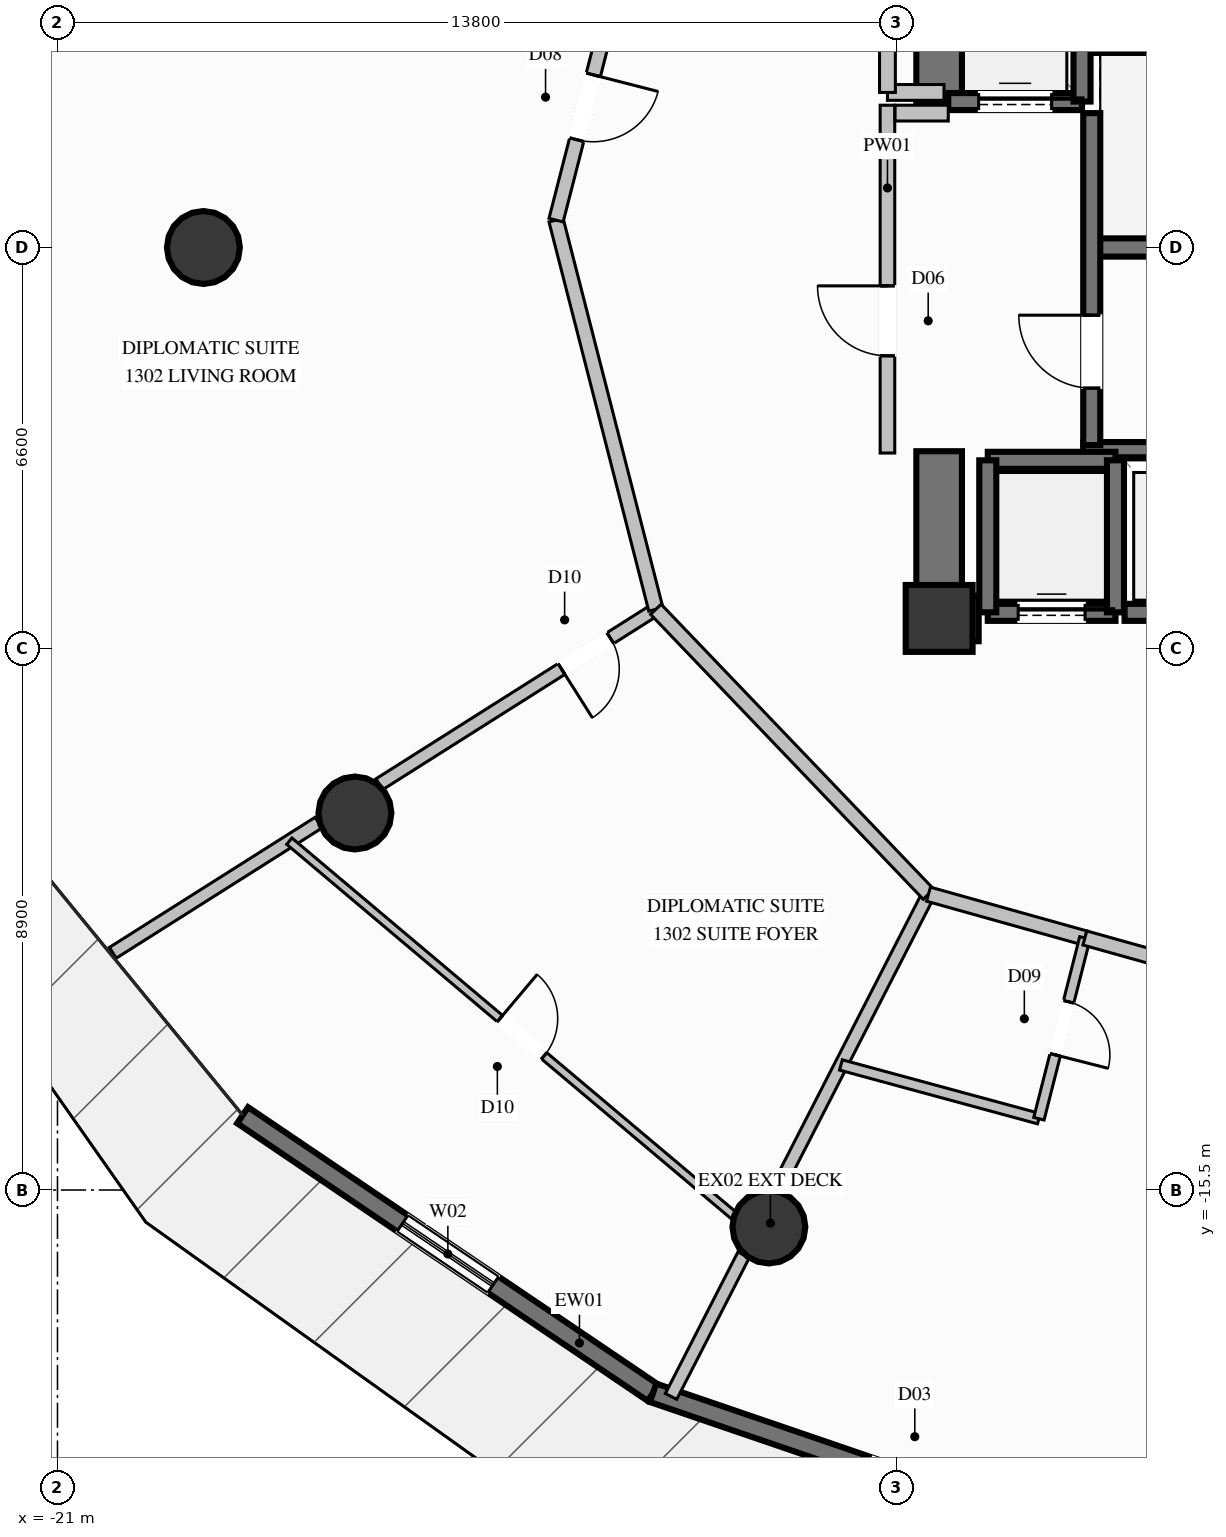
"""IFC4 building model, lengths in metres.
Left out: names, types, materials, properties, quantities, classifications, styles, units other than length and angle.
Written with IfcOpenShell. Run it as: python <this file> out.ifc"""

import sys

from ifc_helpers import new_model, si_unit, direction, frame, frame_2d, origin, origin_2d, place, context, subcontext, project, spatial, rectangle, circle, extrude, element, fill, save


model = new_model("IFC4")
c1 = context("Model", 3, precision=1e-05, world=origin(), true_north=direction((0.0, 1.0)))
c2 = subcontext(c1, "Body", "Model", "MODEL_VIEW")
j1 = project(units=[si_unit("LENGTHUNIT", "METRE"), si_unit("PLANEANGLEUNIT", "RADIAN")], contexts=[c1])
p1 = place(None, origin())
s1 = spatial("IfcSite", under=j1, at=p1, CompositionType="ELEMENT")
p2 = place(p1, origin())
s2 = spatial("IfcBuilding", under=s1, at=p2, CompositionType="ELEMENT")
p3 = place(p2, frame((0.0, 0.0, 50.0)))
s3 = spatial("IfcBuildingStorey", under=s2, at=p3, CompositionType="ELEMENT", Elevation=50.0)
p4 = place(p3, frame((-6.5, -6.1, 0.0), z_axis=(0.0, 0.0, 1.0), x_axis=(1.0, 0.0, 0.0)))
e1 = element("IfcColumn", 1, at=p4, inside=s3, PredefinedType="COLUMN", context=c2, shape_type="SweptSolid", body=[
    extrude(rectangle(XDim=1.1, YDim=1.1, at=origin_2d()), origin(), (0.0, 0.0, 1.0), 3.6),
])
p5 = place(p3, frame((-3.99, 0.0, 0.0), z_axis=(0.0, 0.0, 1.0), x_axis=(1.0, 0.0, 0.0)))
e2 = element("IfcWall", 2, at=p5, inside=s3, PredefinedType="SHEAR", context=c2, shape_type="SweptSolid", body=[
    extrude(rectangle(XDim=7.98, YDim=0.3, at=frame_2d((3.99, 0.0))), origin(), (0.0, 0.0, 1.0), 3.6),
])
for number, where, z_axis, x_axis in (
    (3, (-4.13, -3.325, 0.0), (0.0, 0.0, 1.0), (1.0, 0.0, 0.0)),
    (4, (-4.13, 3.325, 0.0), (0.0, 0.0, 1.0), (1.0, 0.0, 0.0)),
):
    element("IfcWall", number, at=place(p3, frame(where, z_axis=z_axis, x_axis=x_axis)), inside=s3, PredefinedType="SOLIDWALL", context=c2, shape_type="SweptSolid", body=[
        extrude(rectangle(XDim=8.26, YDim=0.25, at=frame_2d((4.13, 0.0))), origin(), (0.0, 0.0, 1.0), 3.6),
    ])
p6 = place(p3, frame((-6.125, -6.1, 0.0), z_axis=(0.0, 0.0, 1.0), x_axis=(1.0, 0.0, 0.0)))
e5 = element("IfcWall", 5, at=p6, inside=s3, PredefinedType="SHEAR", context=c2, shape_type="SweptSolid", body=[
    extrude(rectangle(XDim=0.275, YDim=0.75, at=frame_2d((0.137, 0.0))), origin(), (0.0, 0.0, 1.0), 3.6),
])
p7 = place(p3, frame((-6.5, 2.35, 0.0), z_axis=(0.0, 0.0, 1.0), x_axis=(0.0, 1.0, 0.0)))
e6 = element("IfcWall", 6, at=p7, inside=s3, PredefinedType="SHEAR", context=c2, shape_type="SweptSolid", body=[
    extrude(rectangle(XDim=4.125, YDim=0.75, at=frame_2d((2.062, 0.0))), origin(), (0.0, 0.0, 1.0), 3.6),
])
p8 = place(p3, frame((-6.5, -6.475, 0.0), z_axis=(0.0, 0.0, 1.0), x_axis=(0.0, 1.0, 0.0)))
e7 = element("IfcWall", 7, at=p8, inside=s3, PredefinedType="SHEAR", context=c2, shape_type="SweptSolid", body=[
    extrude(rectangle(XDim=3.125, YDim=0.75, at=frame_2d((1.562, 0.0))), origin(), (0.0, 0.0, 1.0), 3.6),
])
for number, where, z_axis, x_axis in (
    (8, (-18.6, 0.0, 0.0), (0.0, 0.0, 1.0), (1.0, 0.0, 0.0)),
    (9, (-16.108, -9.3, 0.0), (0.0, 0.0, 1.0), (1.0, 0.0, 0.0)),
    (10, (-9.3, -16.108, 0.0), (0.0, 0.0, 1.0), (1.0, 0.0, 0.0)),
):
    element("IfcColumn", number, at=place(p3, frame(where, z_axis=z_axis, x_axis=x_axis)), inside=s3, PredefinedType="COLUMN", context=c2, shape_type="SweptSolid", body=[
        extrude(circle(Radius=0.6, at=origin_2d()), origin(), (0.0, 0.0, 1.0), 3.6),
    ])
p9 = place(p3, frame((-11.204, -18.835, 0.0), z_axis=(0.0, 0.0, 1.0), x_axis=(-0.828391352283, 0.560149772349, 0.0)))
e11 = element("IfcWall", 11, at=p9, inside=s3, PredefinedType="SOLIDWALL", context=c2, shape_type="SweptSolid", body=[
    extrude(rectangle(XDim=8.149, YDim=0.32, at=frame_2d((4.075, 0.0))), origin(), (0.0, 0.0, 1.0), 3.34),
])
p10 = place(p9, frame((3.175, 0.0, 0.35)))
e12 = element("IfcOpeningElement", 12, at=p10, cuts=e11, PredefinedType="OPENING", context=c2, shape_type="SweptSolid", body=[
    extrude(rectangle(XDim=1.8, YDim=2.6, at=frame_2d((0.9, 1.3))), frame((0.0, 0.17, 0.0), z_axis=(0.0, -1.0, 0.0), x_axis=(1.0, 0.0, 0.0)), (0.0, 0.0, 1.0), 0.34),
])
p11 = place(p3, frame((-3.244, -21.557, 0.0), z_axis=(0.0, 0.0, 1.0), x_axis=(-0.94621145459, 0.323548888429, 0.0)))
e13 = element("IfcWall", 13, at=p11, inside=s3, PredefinedType="SOLIDWALL", context=c2, shape_type="SweptSolid", body=[
    extrude(rectangle(XDim=8.413, YDim=0.32, at=frame_2d((4.206, 0.0))), origin(), (0.0, 0.0, 1.0), 3.34),
])
p12 = place(p11, frame((3.557, 0.0, 0.0)))
e14 = element("IfcOpeningElement", 14, at=p12, cuts=e13, PredefinedType="OPENING", context=c2, shape_type="SweptSolid", body=[
    extrude(rectangle(XDim=1.1, YDim=2.2, at=frame_2d((0.55, 1.1))), frame((0.0, 0.17, 0.0), z_axis=(0.0, -1.0, 0.0), x_axis=(1.0, 0.0, 0.0)), (0.0, 0.0, 1.0), 0.34),
])
p13 = place(p3, frame((-5.7, -6.0, 0.0), z_axis=(0.0, 0.0, 1.0), x_axis=(1.0, 0.0, 0.0)))
e15 = element("IfcWall", 15, at=p13, inside=s3, PredefinedType="SOLIDWALL", context=c2, shape_type="SweptSolid", body=[
    extrude(rectangle(XDim=2.1, YDim=0.28, at=frame_2d((1.05, 0.0))), origin(), (0.0, 0.0, 1.0), 3.34),
])
p14 = place(p13, frame((0.5, 0.0, 0.0)))
e16 = element("IfcOpeningElement", 16, at=p14, cuts=e15, PredefinedType="OPENING", context=c2, shape_type="SweptSolid", body=[
    extrude(rectangle(XDim=1.1, YDim=2.2, at=frame_2d((0.55, 1.1))), frame((0.0, 0.15, 0.0), z_axis=(0.0, -1.0, 0.0), x_axis=(1.0, 0.0, 0.0)), (0.0, 0.0, 1.0), 0.3),
])
p15 = place(p3, frame((-3.6, -3.5, 0.0), z_axis=(0.0, 0.0, 1.0), x_axis=(-1.0, 0.0, 0.0)))
e17 = element("IfcWall", 17, at=p15, inside=s3, PredefinedType="SOLIDWALL", context=c2, shape_type="SweptSolid", body=[
    extrude(rectangle(XDim=2.1, YDim=0.28, at=frame_2d((1.05, 0.0))), origin(), (0.0, 0.0, 1.0), 3.34),
])
for number, where, z_axis, x_axis in (
    (18, (-5.7, -3.5, 0.0), (0.0, 0.0, 1.0), (0.0, -1.0, 0.0)),
    (19, (-3.6, -6.0, 0.0), (0.0, 0.0, 1.0), (0.0, 1.0, 0.0)),
):
    element("IfcWall", number, at=place(p3, frame(where, z_axis=z_axis, x_axis=x_axis)), inside=s3, PredefinedType="SOLIDWALL", context=c2, shape_type="SweptSolid", body=[
        extrude(rectangle(XDim=2.5, YDim=0.28, at=frame_2d((1.25, 0.0))), origin(), (0.0, 0.0, 1.0), 3.34),
    ])
p16 = place(p3, frame((-3.45, -6.0, 0.0), z_axis=(0.0, 0.0, 1.0), x_axis=(1.0, 0.0, 0.0)))
e20 = element("IfcWall", 20, at=p16, inside=s3, PredefinedType="SOLIDWALL", context=c2, shape_type="SweptSolid", body=[
    extrude(rectangle(XDim=2.1, YDim=0.28, at=frame_2d((1.05, 0.0))), origin(), (0.0, 0.0, 1.0), 3.34),
])
p17 = place(p16, frame((0.5, 0.0, 0.0)))
e21 = element("IfcOpeningElement", 21, at=p17, cuts=e20, PredefinedType="OPENING", context=c2, shape_type="SweptSolid", body=[
    extrude(rectangle(XDim=1.1, YDim=2.2, at=frame_2d((0.55, 1.1))), frame((0.0, 0.15, 0.0), z_axis=(0.0, -1.0, 0.0), x_axis=(1.0, 0.0, 0.0)), (0.0, 0.0, 1.0), 0.3),
])
p18 = place(p3, frame((-6.35, 2.4, 0.0), z_axis=(0.0, 0.0, 1.0), x_axis=(1.0, 0.0, 0.0)))
e22 = element("IfcWall", 22, at=p18, inside=s3, PredefinedType="SOLIDWALL", context=c2, shape_type="SweptSolid", body=[
    extrude(rectangle(XDim=2.2, YDim=0.28, at=frame_2d((1.1, 0.0))), origin(), (0.0, 0.0, 1.0), 3.34),
])
p19 = place(p18, frame((0.5, 0.0, 0.0)))
e23 = element("IfcOpeningElement", 23, at=p19, cuts=e22, PredefinedType="OPENING", context=c2, shape_type="SweptSolid", body=[
    extrude(rectangle(XDim=1.2, YDim=2.2, at=frame_2d((0.6, 1.1))), frame((0.0, 0.15, 0.0), z_axis=(0.0, -1.0, 0.0), x_axis=(1.0, 0.0, 0.0)), (0.0, 0.0, 1.0), 0.3),
])
p20 = place(p3, frame((-4.15, 2.4, 0.0), z_axis=(0.0, 0.0, 1.0), x_axis=(0.0, 1.0, 0.0)))
e24 = element("IfcWall", 24, at=p20, inside=s3, PredefinedType="SOLIDWALL", context=c2, shape_type="SweptSolid", body=[
    extrude(rectangle(XDim=2.7, YDim=0.28, at=frame_2d((1.35, 0.0))), origin(), (0.0, 0.0, 1.0), 3.34),
])
p21 = place(p3, frame((-3.99, -3.25, 0.0), z_axis=(0.0, 0.0, 1.0), x_axis=(0.0, 1.0, 0.0)))
e25 = element("IfcWall", 25, at=p21, inside=s3, PredefinedType="SOLIDWALL", context=c2, shape_type="SweptSolid", body=[
    extrude(rectangle(XDim=5.46, YDim=0.28, at=frame_2d((2.73, 0.0))), origin(), (0.0, 0.0, 1.0), 3.34),
])
p22 = place(p21, frame((0.937, 0.0, 0.0)))
e26 = element("IfcOpeningElement", 26, at=p22, cuts=e25, PredefinedType="OPENING", context=c2, shape_type="SweptSolid", body=[
    extrude(rectangle(XDim=1.2, YDim=2.2, at=frame_2d((0.6, 1.1))), frame((0.0, 0.15, 0.0), z_axis=(0.0, -1.0, 0.0), x_axis=(1.0, 0.0, 0.0)), (0.0, 0.0, 1.0), 0.3),
])
p23 = place(p3, frame((-7.35, -3.38, 0.0), z_axis=(0.0, 0.0, 1.0), x_axis=(0.0, 1.0, 0.0)))
e27 = element("IfcWall", 27, at=p23, inside=s3, PredefinedType="PARTITIONING", context=c2, shape_type="SweptSolid", body=[
    extrude(rectangle(XDim=5.72, YDim=0.24, at=frame_2d((2.86, 0.0))), origin(), (0.0, 0.0, 1.0), 2.425),
])
p24 = place(p23, frame((1.599, 0.0, 0.0)))
e28 = element("IfcOpeningElement", 28, at=p24, cuts=e27, PredefinedType="OPENING", context=c2, shape_type="SweptSolid", body=[
    extrude(rectangle(XDim=1.15, YDim=2.2, at=frame_2d((0.575, 1.1))), frame((0.0, 0.13, 0.0), z_axis=(0.0, -1.0, 0.0), x_axis=(1.0, 0.0, 0.0)), (0.0, 0.0, 1.0), 0.26),
])
p25 = place(p3, frame((-7.225, 2.21, 0.0), z_axis=(0.0, 0.0, 1.0), x_axis=(1.0, 0.0, 0.0)))
e29 = element("IfcWall", 29, at=p25, inside=s3, PredefinedType="PARTITIONING", context=c2, shape_type="SweptSolid", body=[
    extrude(rectangle(XDim=0.875, YDim=0.26, at=frame_2d((0.438, 0.0))), origin(), (0.0, 0.0, 1.0), 3.34),
])
p26 = place(p3, frame((-7.35, 2.55, 0.0), z_axis=(0.0, 0.0, 1.0), x_axis=(1.0, 0.0, 0.0)))
e30 = element("IfcWall", 30, at=p26, inside=s3, PredefinedType="PARTITIONING", context=c2, shape_type="SweptSolid", body=[
    extrude(rectangle(XDim=0.93, YDim=0.26, at=frame_2d((0.465, 0.0))), origin(), (0.0, 0.0, 1.0), 3.34),
])
p27 = place(p3, frame((-7.35, 2.55, 0.0), z_axis=(0.0, 0.0, 1.0), x_axis=(0.0, 1.0, 0.0)))
e31 = element("IfcWall", 31, at=p27, inside=s3, PredefinedType="PARTITIONING", context=c2, shape_type="SweptSolid", body=[
    extrude(rectangle(XDim=2.4, YDim=0.26, at=frame_2d((1.2, 0.0))), origin(), (0.0, 0.0, 1.0), 2.425),
])
p28 = place(p27, frame((0.775, 0.0, 0.0)))
e32 = element("IfcOpeningElement", 32, at=p28, cuts=e31, PredefinedType="OPENING", context=c2, shape_type="SweptSolid", body=[
    extrude(rectangle(XDim=0.85, YDim=2.05, at=frame_2d((0.425, 1.025))), frame((0.0, 0.14, 0.0), z_axis=(0.0, -1.0, 0.0), x_axis=(1.0, 0.0, 0.0)), (0.0, 0.0, 1.0), 0.28),
])
p29 = place(p3, frame((-11.159, -5.95, 0.0), z_axis=(0.0, 0.0, 1.0), x_axis=(-0.845113553302, -0.534586833008, 0.0)))
e33 = element("IfcWall", 33, at=p29, inside=s3, PredefinedType="PARTITIONING", context=c2, shape_type="SweptSolid", body=[
    extrude(rectangle(XDim=5.382, YDim=0.21, at=frame_2d((2.691, 0.0))), origin(), (0.0, 0.0, 1.0), 2.708),
])
p30 = place(p29, frame((0.886, 0.0, 0.0)))
e34 = element("IfcOpeningElement", 34, at=p30, cuts=e33, PredefinedType="OPENING", context=c2, shape_type="SweptSolid", body=[
    extrude(rectangle(XDim=0.95, YDim=2.1, at=frame_2d((0.475, 1.05))), frame((0.0, 0.115, 0.0), z_axis=(0.0, -1.0, 0.0), x_axis=(1.0, 0.0, 0.0)), (0.0, 0.0, 1.0), 0.23),
])
p31 = place(p3, frame((-16.707, -9.459, 0.0), z_axis=(0.0, 0.0, 1.0), x_axis=(-0.845097392872, -0.53461237973, 0.0)))
e35 = element("IfcWall", 35, at=p31, inside=s3, PredefinedType="PARTITIONING", context=c2, shape_type="SweptSolid", body=[
    extrude(rectangle(XDim=4.003, YDim=0.21, at=frame_2d((2.001, 0.0))), origin(), (0.0, 0.0, 1.0), 3.34),
])
p32 = place(p3, frame((-6.675, -10.635, 0.0), z_axis=(0.0, 0.0, 1.0), x_axis=(-0.456172544556, -0.889891347072, 0.0)))
e36 = element("IfcWall", 36, at=p32, inside=s3, PredefinedType="PARTITIONING", context=c2, shape_type="SweptSolid", body=[
    extrude(rectangle(XDim=5.469, YDim=0.21, at=frame_2d((2.735, 0.0))), origin(), (0.0, 0.0, 1.0), 2.708),
])
p33 = place(p3, frame((-9.716, -16.567, 0.0), z_axis=(0.0, 0.0, 1.0), x_axis=(-0.456153637775, -0.889901038737, 0.0)))
e37 = element("IfcWall", 37, at=p33, inside=s3, PredefinedType="PARTITIONING", context=c2, shape_type="SweptSolid", body=[
    extrude(rectangle(XDim=2.615, YDim=0.21, at=frame_2d((1.308, 0.0))), origin(), (0.0, 0.0, 1.0), 3.34),
])
p34 = place(p3, frame((-12.8, 0.45, 0.0), z_axis=(0.0, 0.0, 1.0), x_axis=(0.24839135289, -0.968659762667, 0.0)))
e38 = element("IfcWall", 38, at=p34, inside=s3, PredefinedType="PARTITIONING", context=c2, shape_type="SweptSolid", body=[
    extrude(rectangle(XDim=6.607, YDim=0.24, at=frame_2d((3.303, 0.0))), origin(), (0.0, 0.0, 1.0), 2.919),
])
p35 = place(p3, frame((-11.848, 4.162, 0.0), z_axis=(0.0, 0.0, 1.0), x_axis=(-0.248451984896, -0.968644212909, 0.0)))
e39 = element("IfcWall", 39, at=p35, inside=s3, PredefinedType="PARTITIONING", context=c2, shape_type="SweptSolid", body=[
    extrude(rectangle(XDim=3.832, YDim=0.24, at=frame_2d((1.916, 0.0))), origin(), (0.0, 0.0, 1.0), 3.34),
])
p36 = place(p35, frame((1.366, 0.0, 0.0)))
e40 = element("IfcOpeningElement", 40, at=p36, cuts=e39, PredefinedType="OPENING", context=c2, shape_type="SweptSolid", body=[
    extrude(rectangle(XDim=1.1, YDim=2.3, at=frame_2d((0.55, 1.15))), frame((0.0, 0.13, 0.0), z_axis=(0.0, -1.0, 0.0), x_axis=(1.0, 0.0, 0.0)), (0.0, 0.0, 1.0), 0.26),
])
p37 = place(p3, frame((-11.159, -5.95, 0.0), z_axis=(0.0, 0.0, 1.0), x_axis=(0.691426053968, -0.722447238138, 0.0)))
e41 = element("IfcWall", 41, at=p37, inside=s3, PredefinedType="PARTITIONING", context=c2, shape_type="SweptSolid", body=[
    extrude(rectangle(XDim=6.485, YDim=0.24, at=frame_2d((3.242, 0.0))), origin(), (0.0, 0.0, 1.0), 3.34),
])
p38 = place(p3, frame((-17.187, -9.763, 0.0), z_axis=(0.0, 0.0, 1.0), x_axis=(0.764837174909, -0.644223638092, 0.0)))
e42 = element("IfcWall", 42, at=p38, inside=s3, PredefinedType="PARTITIONING", context=c2, shape_type="SweptSolid", body=[
    extrude(rectangle(XDim=10.007, YDim=0.135, at=frame_2d((5.004, 0.0))), origin(), (0.0, 0.0, 1.0), 2.792),
])
p39 = place(p38, frame((4.529, 0.0, 0.0)))
e43 = element("IfcOpeningElement", 43, at=p39, cuts=e42, PredefinedType="OPENING", context=c2, shape_type="SweptSolid", body=[
    extrude(rectangle(XDim=0.95, YDim=2.1, at=frame_2d((0.475, 1.05))), frame((0.0, 0.078, 0.0), z_axis=(0.0, -1.0, 0.0), x_axis=(1.0, 0.0, 0.0)), (0.0, 0.0, 1.0), 0.155),
])
p40 = place(p3, frame((-6.675, -10.635, 0.0), z_axis=(0.0, 0.0, 1.0), x_axis=(0.962983004146, -0.269562114782, 0.0)))
e44 = element("IfcWall", 44, at=p40, inside=s3, PredefinedType="PARTITIONING", context=c2, shape_type="SweptSolid", body=[
    extrude(rectangle(XDim=2.671, YDim=0.24, at=frame_2d((1.335, 0.0))), origin(), (0.0, 0.0, 1.0), 3.34),
])
p41 = place(p3, frame((-8.115, -13.443, 0.0), z_axis=(0.0, 0.0, 1.0), x_axis=(0.96508205858, -0.261947743275, 0.0)))
e45 = element("IfcWall", 45, at=p41, inside=s3, PredefinedType="PLUMBINGWALL", context=c2, shape_type="SweptSolid", body=[
    extrude(rectangle(XDim=3.374, YDim=0.175, at=frame_2d((1.687, 0.0))), origin(), (0.0, 0.0, 1.0), 3.34),
])
p42 = place(p3, frame((-4.103, -11.355, 0.0), z_axis=(0.0, 0.0, 1.0), x_axis=(-0.246486233644, -0.969146292684, 0.0)))
e46 = element("IfcWall", 46, at=p42, inside=s3, PredefinedType="PLUMBINGWALL", context=c2, shape_type="SweptSolid", body=[
    extrude(rectangle(XDim=3.067, YDim=0.175, at=frame_2d((1.533, 0.0))), origin(), (0.0, 0.0, 1.0), 3.34),
])
p43 = place(p42, frame((1.083, 0.0, 0.0)))
e47 = element("IfcOpeningElement", 47, at=p43, cuts=e46, PredefinedType="OPENING", context=c2, shape_type="SweptSolid", body=[
    extrude(rectangle(XDim=0.9, YDim=2.1, at=frame_2d((0.45, 1.05))), frame((0.0, 0.098, 0.0), z_axis=(0.0, -1.0, 0.0), x_axis=(1.0, 0.0, 0.0)), (0.0, 0.0, 1.0), 0.195),
])
p44 = place(p3, frame((-4.103, -11.355, 0.0), z_axis=(0.0, 0.0, 1.0), x_axis=(0.962944088122, -0.269701099648, 0.0)))
e48 = element("IfcWall", 48, at=p44, inside=s3, PredefinedType="PARTITIONING", context=c2, shape_type="SweptSolid", body=[
    extrude(rectangle(XDim=3.69, YDim=0.24, at=frame_2d((1.845, 0.0))), origin(), (0.0, 0.0, 1.0), 2.919),
])
p45 = place(p44, frame((1.295, 0.0, 0.0)))
e49 = element("IfcOpeningElement", 49, at=p45, cuts=e48, PredefinedType="OPENING", context=c2, shape_type="SweptSolid", body=[
    extrude(rectangle(XDim=1.1, YDim=2.3, at=frame_2d((0.55, 1.15))), frame((0.0, 0.13, 0.0), z_axis=(0.0, -1.0, 0.0), x_axis=(1.0, 0.0, 0.0)), (0.0, 0.0, 1.0), 0.26),
])
p46 = place(p10, origin())
e50 = element("IfcWindow", 50, at=p46, inside=s3, PartitioningType="SINGLE_PANEL", PredefinedType="WINDOW", context=c2, shape_type="SweptSolid", body=[
    extrude(rectangle(XDim=1.8, YDim=2.6, at=frame_2d((0.9, 1.3))), frame((0.0, 0.03, 0.0), z_axis=(0.0, -1.0, 0.0), x_axis=(1.0, 0.0, 0.0)), (0.0, 0.0, 1.0), 0.06),
])
fill(e12, e50)
p47 = place(p14, origin())
e51 = element("IfcDoor", 51, at=p47, inside=s3, OperationType="SLIDING_TO_LEFT", PredefinedType="DOOR", context=c2, shape_type="SweptSolid", body=[
    extrude(rectangle(XDim=1.1, YDim=2.2, at=frame_2d((0.55, 1.1))), frame((0.0, 0.025, 0.0), z_axis=(0.0, -1.0, 0.0), x_axis=(1.0, 0.0, 0.0)), (0.0, 0.0, 1.0), 0.05),
])
fill(e16, e51)
p48 = place(p19, origin())
e52 = element("IfcDoor", 52, at=p48, inside=s3, OperationType="SLIDING_TO_LEFT", PredefinedType="DOOR", context=c2, shape_type="SweptSolid", body=[
    extrude(rectangle(XDim=1.2, YDim=2.2, at=frame_2d((0.6, 1.1))), frame((0.0, 0.025, 0.0), z_axis=(0.0, -1.0, 0.0), x_axis=(1.0, 0.0, 0.0)), (0.0, 0.0, 1.0), 0.05),
])
fill(e23, e52)
p49 = place(p22, origin())
e53 = element("IfcDoor", 53, at=p49, inside=s3, OperationType="SINGLE_SWING_RIGHT", PredefinedType="DOOR", context=c2, shape_type="SweptSolid", body=[
    extrude(rectangle(XDim=1.2, YDim=2.2, at=frame_2d((0.6, 1.1))), frame((0.0, 0.025, 0.0), z_axis=(0.0, -1.0, 0.0), x_axis=(1.0, 0.0, 0.0)), (0.0, 0.0, 1.0), 0.05),
])
fill(e26, e53)
p50 = place(p24, origin())
e54 = element("IfcDoor", 54, at=p50, inside=s3, OperationType="SINGLE_SWING_RIGHT", PredefinedType="DOOR", context=c2, shape_type="SweptSolid", body=[
    extrude(rectangle(XDim=1.15, YDim=2.2, at=frame_2d((0.575, 1.1))), frame((0.0, 0.025, 0.0), z_axis=(0.0, -1.0, 0.0), x_axis=(1.0, 0.0, 0.0)), (0.0, 0.0, 1.0), 0.05),
])
fill(e28, e54)
p51 = place(p36, origin())
e55 = element("IfcDoor", 55, at=p51, inside=s3, OperationType="SINGLE_SWING_LEFT", PredefinedType="DOOR", context=c2, shape_type="SweptSolid", body=[
    extrude(rectangle(XDim=1.1, YDim=2.3, at=frame_2d((0.55, 1.15))), frame((0.0, 0.025, 0.0), z_axis=(0.0, -1.0, 0.0), x_axis=(1.0, 0.0, 0.0)), (0.0, 0.0, 1.0), 0.05),
])
fill(e40, e55)
p52 = place(p30, origin())
e56 = element("IfcDoor", 56, at=p52, inside=s3, OperationType="SINGLE_SWING_RIGHT", PredefinedType="DOOR", context=c2, shape_type="SweptSolid", body=[
    extrude(rectangle(XDim=0.95, YDim=2.1, at=frame_2d((0.475, 1.05))), frame((0.0, 0.025, 0.0), z_axis=(0.0, -1.0, 0.0), x_axis=(1.0, 0.0, 0.0)), (0.0, 0.0, 1.0), 0.05),
])
fill(e34, e56)
p53 = place(p39, origin())
e57 = element("IfcDoor", 57, at=p53, inside=s3, OperationType="SINGLE_SWING_LEFT", PredefinedType="DOOR", context=c2, shape_type="SweptSolid", body=[
    extrude(rectangle(XDim=0.95, YDim=2.1, at=frame_2d((0.475, 1.05))), frame((0.0, 0.025, 0.0), z_axis=(0.0, -1.0, 0.0), x_axis=(1.0, 0.0, 0.0)), (0.0, 0.0, 1.0), 0.05),
])
fill(e43, e57)
p54 = place(p43, origin())
e58 = element("IfcDoor", 58, at=p54, inside=s3, OperationType="SINGLE_SWING_RIGHT", PredefinedType="DOOR", context=c2, shape_type="SweptSolid", body=[
    extrude(rectangle(XDim=0.9, YDim=2.1, at=frame_2d((0.45, 1.05))), frame((0.0, 0.025, 0.0), z_axis=(0.0, -1.0, 0.0), x_axis=(1.0, 0.0, 0.0)), (0.0, 0.0, 1.0), 0.05),
])
fill(e47, e58)
save(model, sys.argv[1])
